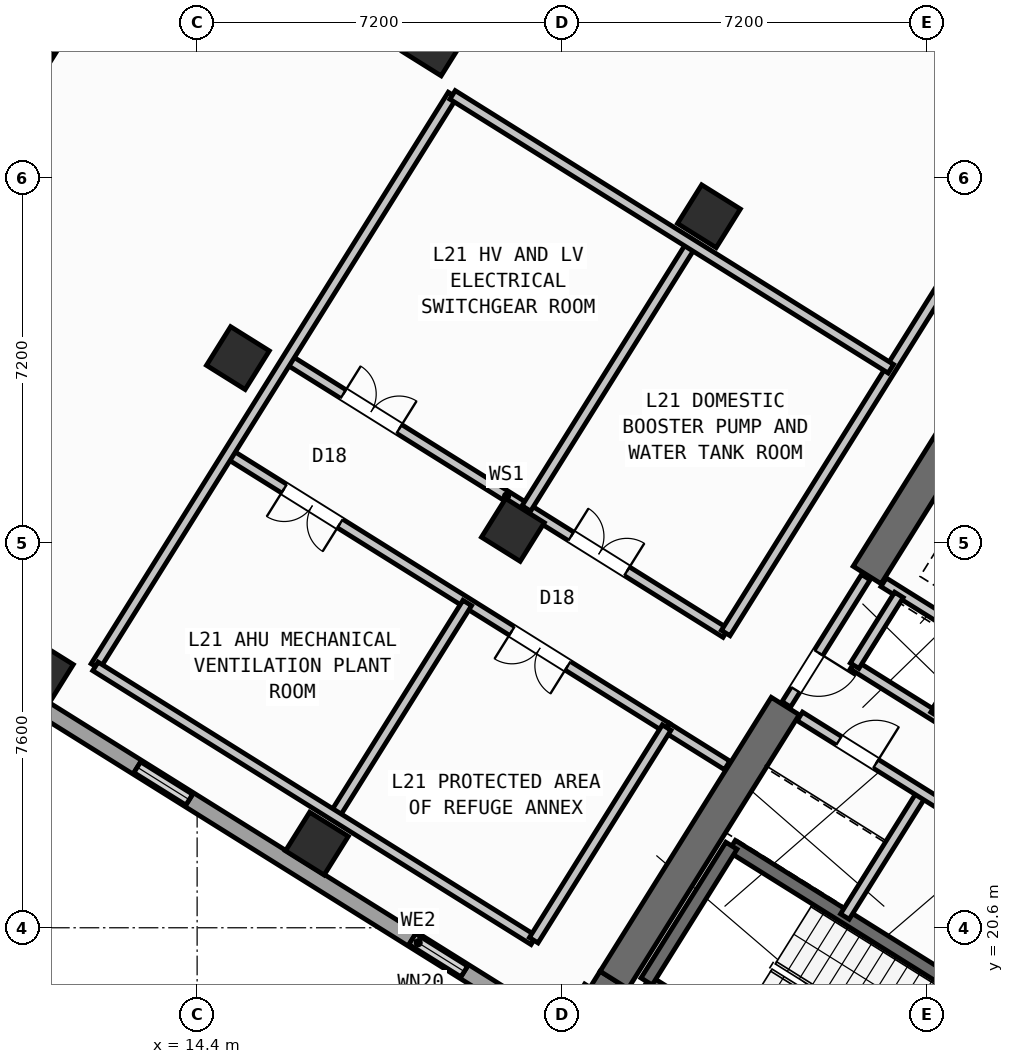
"""IFC4 building model, lengths in metres.
Left out: names, types, materials, properties, quantities, classifications, styles, units other than length and angle.
Written with IfcOpenShell. Run it as: python <this file> out.ifc"""

import sys

from ifc_helpers import new_model, si_unit, direction, frame, frame_2d, origin, origin_2d, place, context, subcontext, project, spatial, rectangle, hollow_rectangle, extrude, source, transform, mapped, element, fill, save


model = new_model("IFC4")
c1 = context("Model", 3, precision=1e-05, world=origin(), true_north=direction((0.0, 1.0)))
c2 = subcontext(c1, "Body", "Model", "MODEL_VIEW")
j1 = project(units=[si_unit("LENGTHUNIT", "METRE"), si_unit("PLANEANGLEUNIT", "RADIAN")], contexts=[c1])
p1 = place(None, origin())
s1 = spatial("IfcSite", under=j1, at=p1, CompositionType="ELEMENT")
p2 = place(p1, origin())
s2 = spatial("IfcBuilding", under=s1, at=p2, CompositionType="ELEMENT")
p3 = place(p2, frame((0.0, 0.0, 84.6)))
s3 = spatial("IfcBuildingStorey", under=s2, at=p3, CompositionType="ELEMENT", Elevation=84.6)
p4 = place(p3, frame((33.409, 12.45, 0.0), z_axis=(0.0, 0.0, 1.0), x_axis=(-0.848051132073, 0.529914405721, 0.0)))
e1 = element("IfcWall", 1, at=p4, inside=s3, PredefinedType="SHEAR", context=c2, shape_type="SweptSolid", body=[
    extrude(rectangle(XDim=13.24, YDim=0.65, at=frame_2d((6.62, 0.0))), origin(), (0.0, 0.0, 1.0), 5.15),
])
p5 = place(p3, frame((29.491, 30.552, 0.0), z_axis=(0.0, 0.0, 1.0), x_axis=(-0.529893103397, -0.8480644427, 0.0)))
e2 = element("IfcWall", 2, at=p5, inside=s3, PredefinedType="SHEAR", context=c2, shape_type="SweptSolid", body=[
    extrude(rectangle(XDim=3.525, YDim=0.65, at=frame_2d((1.763, 0.0))), origin(), (0.0, 0.0, 1.0), 5.15),
])
p6 = place(p3, frame((26.007, 24.976, 0.0), z_axis=(0.0, 0.0, 1.0), x_axis=(-0.529916319127, -0.848049936456, 0.0)))
e3 = element("IfcWall", 3, at=p6, inside=s3, PredefinedType="SHEAR", context=c2, shape_type="SweptSolid", body=[
    extrude(rectangle(XDim=6.375, YDim=0.65, at=frame_2d((3.188, 0.0))), origin(), (0.0, 0.0, 1.0), 5.15),
])
m1 = source(origin(), c2, "Body", "SweptSolid", [
    extrude(hollow_rectangle(XDim=0.9, YDim=0.9, WallThickness=0.036, at=origin_2d()), origin(), (0.0, 0.0, 1.0), 5.4),
])
for number, where, z_axis, x_axis in (
    (4, (24.5, 34.643, 0.0), (0.0, 0.0, 1.0), (-0.848, 0.53, 0.0)),
    (5, (20.632, 28.452, 0.0), (0.0, 0.0, 1.0), (-0.848, 0.53, 0.0)),
    (6, (16.764, 22.261, 0.0), (0.0, 0.0, 1.0), (-0.848, 0.53, 0.0)),
    (7, (19.073, 38.034, 0.0), (0.0, 0.0, 1.0), (-0.848, 0.53, 0.0)),
    (8, (15.205, 31.844, 0.0), (0.0, 0.0, 1.0), (-0.848, 0.53, 0.0)),
    (9, (11.336, 25.653, 0.0), (0.0, 0.0, 1.0), (-0.848, 0.53, 0.0)),
):
    element("IfcColumn", number, at=place(p3, frame(where, z_axis=z_axis, x_axis=x_axis)), inside=s3, PredefinedType="COLUMN", context=c2, shape_type="MappedRepresentation", body=[
        mapped(m1, transform((0.0, 0.0, 0.0), scale=1.0)),
    ])
p7 = place(p3, frame((31.76, 12.183, 0.0), z_axis=(0.0, 0.0, 1.0), x_axis=(-0.848047074256, 0.529920899612, 0.0)))
e10 = element("IfcWall", 10, at=p7, inside=s3, PredefinedType="STANDARD", context=c2, shape_type="SweptSolid", body=[
    extrude(rectangle(XDim=30.652, YDim=0.32, at=frame_2d((15.326, 0.0))), origin(), (0.0, 0.0, 1.0), 5.15),
])
p8 = place(p7, frame((5.029, 0.0, 0.95)))
e11 = element("IfcOpeningElement", 11, at=p8, cuts=e10, PredefinedType="OPENING", context=c2, shape_type="SweptSolid", body=[
    extrude(rectangle(XDim=1.25, YDim=1.4, at=frame_2d((0.625, 0.7))), frame((0.0, 0.17, 0.0), z_axis=(0.0, -1.0, 0.0), x_axis=(1.0, 0.0, 0.0)), (0.0, 0.0, 1.0), 0.34),
])
p9 = place(p7, frame((14.233, 0.0, 0.95)))
e12 = element("IfcOpeningElement", 12, at=p9, cuts=e10, PredefinedType="OPENING", context=c2, shape_type="SweptSolid", body=[
    extrude(rectangle(XDim=1.25, YDim=1.4, at=frame_2d((0.625, 0.7))), frame((0.0, 0.17, 0.0), z_axis=(0.0, -1.0, 0.0), x_axis=(1.0, 0.0, 0.0)), (0.0, 0.0, 1.0), 0.34),
])
p10 = place(p7, frame((20.633, 0.0, 0.95)))
e13 = element("IfcOpeningElement", 13, at=p10, cuts=e10, PredefinedType="OPENING", context=c2, shape_type="SweptSolid", body=[
    extrude(rectangle(XDim=1.25, YDim=1.4, at=frame_2d((0.625, 0.7))), frame((0.0, 0.17, 0.0), z_axis=(0.0, -1.0, 0.0), x_axis=(1.0, 0.0, 0.0)), (0.0, 0.0, 1.0), 0.34),
])
p11 = place(p7, frame((27.033, 0.0, 0.95)))
e14 = element("IfcOpeningElement", 14, at=p11, cuts=e10, PredefinedType="OPENING", context=c2, shape_type="SweptSolid", body=[
    extrude(rectangle(XDim=1.25, YDim=1.4, at=frame_2d((0.625, 0.7))), frame((0.0, 0.17, 0.0), z_axis=(0.0, -1.0, 0.0), x_axis=(1.0, 0.0, 0.0)), (0.0, 0.0, 1.0), 0.34),
])
p12 = place(p3, frame((5.7, 28.71, 0.0), z_axis=(0.0, 0.0, 1.0), x_axis=(0.529923711467, 0.8480453172, 0.0)))
e15 = element("IfcWall", 15, at=p12, inside=s3, PredefinedType="STANDARD", context=c2, shape_type="SweptSolid", body=[
    extrude(rectangle(XDim=21.587, YDim=0.32, at=frame_2d((10.794, 0.0))), origin(), (0.0, 0.0, 1.0), 4.575),
])
p13 = place(p12, frame((3.419, 0.0, 0.95)))
e16 = element("IfcOpeningElement", 16, at=p13, cuts=e15, PredefinedType="OPENING", context=c2, shape_type="SweptSolid", body=[
    extrude(rectangle(XDim=1.25, YDim=1.4, at=frame_2d((0.625, 0.7))), frame((0.0, 0.17, 0.0), z_axis=(0.0, -1.0, 0.0), x_axis=(1.0, 0.0, 0.0)), (0.0, 0.0, 1.0), 0.34),
])
p14 = place(p12, frame((10.719, 0.0, 0.95)))
e17 = element("IfcOpeningElement", 17, at=p14, cuts=e15, PredefinedType="OPENING", context=c2, shape_type="SweptSolid", body=[
    extrude(rectangle(XDim=1.25, YDim=1.4, at=frame_2d((0.625, 0.7))), frame((0.0, 0.17, 0.0), z_axis=(0.0, -1.0, 0.0), x_axis=(1.0, 0.0, 0.0)), (0.0, 0.0, 1.0), 0.34),
])
p15 = place(p12, frame((17.069, 0.0, 0.95)))
e18 = element("IfcOpeningElement", 18, at=p15, cuts=e15, PredefinedType="OPENING", context=c2, shape_type="SweptSolid", body=[
    extrude(rectangle(XDim=1.25, YDim=1.4, at=frame_2d((0.625, 0.7))), frame((0.0, 0.17, 0.0), z_axis=(0.0, -1.0, 0.0), x_axis=(1.0, 0.0, 0.0)), (0.0, 0.0, 1.0), 0.34),
])
p16 = place(p3, frame((17.424, 47.083, 0.0), z_axis=(0.0, 0.0, 1.0), x_axis=(0.848049927979, -0.529916332693, 0.0)))
e19 = element("IfcWall", 19, at=p16, inside=s3, PredefinedType="STANDARD", context=c2, shape_type="SweptSolid", body=[
    extrude(rectangle(XDim=29.223, YDim=0.32, at=frame_2d((14.612, 0.0))), origin(), (0.0, 0.0, 1.0), 5.15),
])
p17 = place(p16, frame((23.579, 0.0, 0.95)))
e20 = element("IfcOpeningElement", 20, at=p17, cuts=e19, PredefinedType="OPENING", context=c2, shape_type="SweptSolid", body=[
    extrude(rectangle(XDim=1.25, YDim=1.4, at=frame_2d((0.625, 0.7))), frame((0.0, 0.17, 0.0), z_axis=(0.0, -1.0, 0.0), x_axis=(1.0, 0.0, 0.0)), (0.0, 0.0, 1.0), 0.34),
])
p18 = place(p3, frame((29.605, 15.581, 0.0), z_axis=(0.0, 0.0, 1.0), x_axis=(-0.848036911448, 0.529937163087, 0.0)))
e21 = element("IfcWall", 21, at=p18, inside=s3, PredefinedType="SHEAR", context=c2, shape_type="SweptSolid", body=[
    extrude(rectangle(XDim=7.46, YDim=0.26, at=frame_2d((3.73, 0.0))), origin(), (0.0, 0.0, 1.0), 5.15),
])
p19 = place(p3, frame((31.28, 18.261, 0.0), z_axis=(0.0, 0.0, 1.0), x_axis=(-0.848051618787, 0.529913626805, 0.0)))
e22 = element("IfcWall", 22, at=p19, inside=s3, PredefinedType="SHEAR", context=c2, shape_type="SweptSolid", body=[
    extrude(rectangle(XDim=7.46, YDim=0.26, at=frame_2d((3.73, 0.0))), origin(), (0.0, 0.0, 1.0), 5.15),
])
p20 = place(p19, frame((0.36, 0.0, 0.0)))
e23 = element("IfcOpeningElement", 23, at=p20, cuts=e22, PredefinedType="OPENING", context=c2, shape_type="SweptSolid", body=[
    extrude(rectangle(XDim=0.86, YDim=2.05, at=frame_2d((0.43, 1.025))), frame((0.0, 0.14, 0.0), z_axis=(0.0, -1.0, 0.0), x_axis=(1.0, 0.0, 0.0)), (0.0, 0.0, 1.0), 0.28),
])
p21 = place(p3, frame((24.945, 22.22, 0.0), z_axis=(0.0, 0.0, 1.0), x_axis=(-0.529908658664, -0.84805472316, 0.0)))
e24 = element("IfcWall", 24, at=p21, inside=s3, PredefinedType="SHEAR", context=c2, shape_type="SweptSolid", body=[
    extrude(rectangle(XDim=3.16, YDim=0.26, at=frame_2d((1.58, 0.0))), origin(), (0.0, 0.0, 1.0), 5.15),
])
p22 = place(p3, frame((31.822, 24.998, 0.0), z_axis=(0.0, 0.0, 1.0), x_axis=(-0.848058348634, 0.529902856485, 0.0)))
e25 = element("IfcWall", 25, at=p22, inside=s3, PredefinedType="STANDARD", context=c2, shape_type="SweptSolid", body=[
    extrude(rectangle(XDim=4.568, YDim=0.2, at=frame_2d((2.284, 0.0))), origin(), (0.0, 0.0, 1.0), 5.14),
])
p23 = place(p3, frame((32.108, 22.814, 0.0), z_axis=(0.0, 0.0, 1.0), x_axis=(-0.848042229521, 0.529928652696, 0.0)))
e26 = element("IfcWall", 26, at=p23, inside=s3, PredefinedType="STANDARD", context=c2, shape_type="SweptSolid", body=[
    extrude(rectangle(XDim=5.62, YDim=0.2, at=frame_2d((2.81, 0.0))), origin(), (0.0, 0.0, 1.0), 5.14),
])
p24 = place(p3, frame((28.25, 27.17, 0.0), z_axis=(0.0, 0.0, 1.0), x_axis=(-0.529905827651, -0.848056492117, 0.0)))
e27 = element("IfcWall", 27, at=p24, inside=s3, PredefinedType="STANDARD", context=c2, shape_type="SweptSolid", body=[
    extrude(rectangle(XDim=1.65, YDim=0.2, at=frame_2d((0.825, 0.0))), origin(), (0.0, 0.0, 1.0), 5.14),
])
p25 = place(p3, frame((29.801, 26.142, 0.0), z_axis=(0.0, 0.0, 1.0), x_axis=(-0.529998940003, -0.847998304005, 0.0)))
e28 = element("IfcWall", 28, at=p25, inside=s3, PredefinedType="STANDARD", context=c2, shape_type="SweptSolid", body=[
    extrude(rectangle(XDim=1.58, YDim=0.2, at=frame_2d((0.79, 0.0))), origin(), (0.0, 0.0, 1.0), 5.14),
])
p26 = place(p3, frame((28.71, 23.263, 0.0), z_axis=(0.0, 0.0, 1.0), x_axis=(-0.529907497854, -0.848055448493, 0.0)))
e29 = element("IfcWall", 29, at=p26, inside=s3, PredefinedType="STANDARD", context=c2, shape_type="SweptSolid", body=[
    extrude(rectangle(XDim=2.88, YDim=0.2, at=frame_2d((1.44, 0.0))), origin(), (0.0, 0.0, 1.0), 5.14),
])
p27 = place(p3, frame((31.525, 21.504, 0.0), z_axis=(0.0, 0.0, 1.0), x_axis=(-0.848044998614, 0.529924221305, 0.0)))
e30 = element("IfcWall", 30, at=p27, inside=s3, PredefinedType="STANDARD", context=c2, shape_type="SweptSolid", body=[
    extrude(rectangle(XDim=6.168, YDim=0.2, at=frame_2d((3.084, 0.0))), origin(), (0.0, 0.0, 1.0), 5.14),
])
p28 = place(p27, frame((4.4, 0.0, 0.0)))
e31 = element("IfcOpeningElement", 31, at=p28, cuts=e30, PredefinedType="OPENING", context=c2, shape_type="SweptSolid", body=[
    extrude(rectangle(XDim=0.86, YDim=2.05, at=frame_2d((0.43, 1.025))), frame((0.0, 0.11, 0.0), z_axis=(0.0, -1.0, 0.0), x_axis=(1.0, 0.0, 0.0)), (0.0, 0.0, 1.0), 0.22),
])
p29 = place(p27, frame((1.45, 0.0, 0.0)))
e32 = element("IfcOpeningElement", 32, at=p29, cuts=e30, PredefinedType="OPENING", context=c2, shape_type="SweptSolid", body=[
    extrude(rectangle(XDim=0.86, YDim=2.05, at=frame_2d((0.43, 1.025))), frame((0.0, 0.11, 0.0), z_axis=(0.0, -1.0, 0.0), x_axis=(1.0, 0.0, 0.0)), (0.0, 0.0, 1.0), 0.22),
])
p30 = place(p3, frame((24.832, 26.417, 0.0), z_axis=(0.0, 0.0, 1.0), x_axis=(-0.848045364107, 0.529923636401, 0.0)))
e33 = element("IfcWall", 33, at=p30, inside=s3, PredefinedType="STANDARD", context=c2, shape_type="SweptSolid", body=[
    extrude(rectangle(XDim=10.2, YDim=0.2, at=frame_2d((5.1, 0.0))), origin(), (0.0, 0.0, 1.0), 5.14),
])
p31 = place(p30, frame((2.3, 0.0, 0.0)))
e34 = element("IfcOpeningElement", 34, at=p31, cuts=e33, PredefinedType="OPENING", context=c2, shape_type="SweptSolid", body=[
    extrude(rectangle(XDim=1.3, YDim=2.15, at=frame_2d((0.65, 1.075))), frame((0.0, 0.11, 0.0), z_axis=(0.0, -1.0, 0.0), x_axis=(1.0, 0.0, 0.0)), (0.0, 0.0, 1.0), 0.22),
])
p32 = place(p30, frame((7.6, 0.0, 0.0)))
e35 = element("IfcOpeningElement", 35, at=p32, cuts=e33, PredefinedType="OPENING", context=c2, shape_type="SweptSolid", body=[
    extrude(rectangle(XDim=1.3, YDim=2.15, at=frame_2d((0.65, 1.075))), frame((0.0, 0.11, 0.0), z_axis=(0.0, -1.0, 0.0), x_axis=(1.0, 0.0, 0.0)), (0.0, 0.0, 1.0), 0.22),
])
p33 = place(p3, frame((23.666, 24.552, 0.0), z_axis=(0.0, 0.0, 1.0), x_axis=(-0.848038642463, 0.529934393004, 0.0)))
e36 = element("IfcWall", 36, at=p33, inside=s3, PredefinedType="STANDARD", context=c2, shape_type="SweptSolid", body=[
    extrude(rectangle(XDim=10.2, YDim=0.2, at=frame_2d((5.1, 0.0))), origin(), (0.0, 0.0, 1.0), 5.14),
])
p34 = place(p33, frame((2.3, 0.0, 0.0)))
e37 = element("IfcOpeningElement", 37, at=p34, cuts=e36, PredefinedType="OPENING", context=c2, shape_type="SweptSolid", body=[
    extrude(rectangle(XDim=1.3, YDim=2.15, at=frame_2d((0.65, 1.075))), frame((0.0, 0.11, 0.0), z_axis=(0.0, -1.0, 0.0), x_axis=(1.0, 0.0, 0.0)), (0.0, 0.0, 1.0), 0.22),
])
p35 = place(p33, frame((7.6, 0.0, 0.0)))
e38 = element("IfcOpeningElement", 38, at=p35, cuts=e36, PredefinedType="OPENING", context=c2, shape_type="SweptSolid", body=[
    extrude(rectangle(XDim=1.3, YDim=2.15, at=frame_2d((0.65, 1.075))), frame((0.0, 0.11, 0.0), z_axis=(0.0, -1.0, 0.0), x_axis=(1.0, 0.0, 0.0)), (0.0, 0.0, 1.0), 0.22),
])
p36 = place(p3, frame((19.441, 37.038, 0.0), z_axis=(0.0, 0.0, 1.0), x_axis=(-0.529936237412, -0.848037489901, 0.0)))
e39 = element("IfcWall", 39, at=p36, inside=s3, PredefinedType="STANDARD", context=c2, shape_type="SweptSolid", body=[
    extrude(rectangle(XDim=13.3, YDim=0.2, at=frame_2d((6.65, 0.0))), origin(), (0.0, 0.0, 1.0), 5.14),
])
p37 = place(p3, frame((27.596, 27.52, 0.0), z_axis=(0.0, 0.0, 1.0), x_axis=(-0.529865479138, -0.848081702443, 0.0)))
e40 = element("IfcWall", 40, at=p37, inside=s3, PredefinedType="STANDARD", context=c2, shape_type="SweptSolid", body=[
    extrude(rectangle(XDim=2.96, YDim=0.2, at=frame_2d((1.48, 0.0))), origin(), (0.0, 0.0, 1.0), 5.14),
])
p38 = place(p37, frame((1.76, 0.0, 0.0)))
e41 = element("IfcOpeningElement", 41, at=p38, cuts=e40, PredefinedType="OPENING", context=c2, shape_type="SweptSolid", body=[
    extrude(rectangle(XDim=0.86, YDim=2.05, at=frame_2d((0.43, 1.025))), frame((0.0, 0.11, 0.0), z_axis=(0.0, -1.0, 0.0), x_axis=(1.0, 0.0, 0.0)), (0.0, 0.0, 1.0), 0.22),
])
p39 = place(p3, frame((24.86, 23.805, 0.0), z_axis=(0.0, 0.0, 1.0), x_axis=(-0.848066485351, 0.529889834233, 0.0)))
e42 = element("IfcWall", 42, at=p39, inside=s3, PredefinedType="STANDARD", context=c2, shape_type="SweptSolid", body=[
    extrude(rectangle(XDim=1.408, YDim=0.2, at=frame_2d((0.704, 0.0))), origin(), (0.0, 0.0, 1.0), 5.14),
])
p40 = place(p3, frame((31.112, 36.467, 0.0), z_axis=(0.0, 0.0, 1.0), x_axis=(-0.529921156925, -0.848046913469, 0.0)))
e43 = element("IfcWall", 43, at=p40, inside=s3, PredefinedType="STANDARD", context=c2, shape_type="SweptSolid", body=[
    extrude(rectangle(XDim=11.85, YDim=0.2, at=frame_2d((5.925, 0.0))), origin(), (0.0, 0.0, 1.0), 5.14),
])
p41 = place(p3, frame((19.731, 27.01, 0.0), z_axis=(0.0, 0.0, 1.0), x_axis=(-0.529896970672, -0.848062026312, 0.0)))
e44 = element("IfcWall", 44, at=p41, inside=s3, PredefinedType="STANDARD", context=c2, shape_type="SweptSolid", body=[
    extrude(rectangle(XDim=4.95, YDim=0.2, at=frame_2d((2.475, 0.0))), origin(), (0.0, 0.0, 1.0), 4.575),
])
p42 = place(p3, frame((24.156, 34.092, 0.0), z_axis=(0.0, 0.0, 1.0), x_axis=(-0.529934707271, -0.84803844608, 0.0)))
e45 = element("IfcWall", 45, at=p42, inside=s3, PredefinedType="STANDARD", context=c2, shape_type="SweptSolid", body=[
    extrude(rectangle(XDim=6.15, YDim=0.2, at=frame_2d((3.075, 0.0))), origin(), (0.0, 0.0, 1.0), 4.575),
])
p43 = place(p3, frame((21.043, 20.354, 0.0), z_axis=(0.0, 0.0, 1.0), x_axis=(-0.848045364107, 0.529923636401, 0.0)))
e46 = element("IfcWall", 46, at=p43, inside=s3, PredefinedType="STANDARD", context=c2, shape_type="SweptSolid", body=[
    extrude(rectangle(XDim=10.2, YDim=0.2, at=frame_2d((5.1, 0.0))), origin(), (0.0, 0.0, 1.0), 5.14),
])
p44 = place(p3, frame((28.091, 31.633, 0.0), z_axis=(0.0, 0.0, 1.0), x_axis=(-0.848049399204, 0.529917178916, 0.0)))
e47 = element("IfcWall", 47, at=p44, inside=s3, PredefinedType="STANDARD", context=c2, shape_type="SweptSolid", body=[
    extrude(rectangle(XDim=10.2, YDim=0.2, at=frame_2d((5.1, 0.0))), origin(), (0.0, 0.0, 1.0), 5.14),
])
p45 = place(p3, frame((23.666, 24.552, 0.0), z_axis=(0.0, 0.0, 1.0), x_axis=(-0.529919135231, -0.848048176766, 0.0)))
e48 = element("IfcWall", 48, at=p45, inside=s3, PredefinedType="STANDARD", context=c2, shape_type="SweptSolid", body=[
    extrude(rectangle(XDim=4.95, YDim=0.2, at=frame_2d((2.475, 0.0))), origin(), (0.0, 0.0, 1.0), 5.14),
])
m2 = source(origin(), c2, "Body", "SweptSolid", [
    extrude(rectangle(XDim=1.25, YDim=1.4, at=frame_2d((0.625, 0.7))), frame((0.0, 0.03, 0.0), z_axis=(0.0, -1.0, 0.0), x_axis=(1.0, 0.0, 0.0)), (0.0, 0.0, 1.0), 0.06),
])
p46 = place(p9, origin())
e49 = element("IfcWindow", 49, at=p46, inside=s3, PartitioningType="SINGLE_PANEL", PredefinedType="WINDOW", context=c2, shape_type="MappedRepresentation", body=[
    mapped(m2, transform((0.0, 0.0, 0.0), scale=1.0)),
])
fill(e12, e49)
p47 = place(p10, origin())
e50 = element("IfcWindow", 50, at=p47, inside=s3, PartitioningType="SINGLE_PANEL", PredefinedType="WINDOW", context=c2, shape_type="MappedRepresentation", body=[
    mapped(m2, transform((0.0, 0.0, 0.0), scale=1.0)),
])
fill(e13, e50)
p48 = place(p14, origin())
e51 = element("IfcWindow", 51, at=p48, inside=s3, PartitioningType="SINGLE_PANEL", PredefinedType="WINDOW", context=c2, shape_type="MappedRepresentation", body=[
    mapped(m2, transform((0.0, 0.0, 0.0), scale=1.0)),
])
fill(e17, e51)
m3 = source(origin(), c2, "Body", "SweptSolid", [
    extrude(rectangle(XDim=0.86, YDim=2.05, at=frame_2d((0.43, 1.025))), frame((0.0, 0.025, 0.0), z_axis=(0.0, -1.0, 0.0), x_axis=(1.0, 0.0, 0.0)), (0.0, 0.0, 1.0), 0.05),
])
p49 = place(p28, frame((0.86, 0.0, 0.0), z_axis=(0.0, 0.0, 1.0), x_axis=(-1.0, 0.0, 0.0)))
e52 = element("IfcDoor", 52, at=p49, inside=s3, OperationType="SINGLE_SWING_RIGHT", PredefinedType="DOOR", context=c2, shape_type="MappedRepresentation", body=[
    mapped(m3, transform((0.0, 0.0, 0.0), scale=1.0)),
])
fill(e31, e52)
p50 = place(p38, origin())
e53 = element("IfcDoor", 53, at=p50, inside=s3, OperationType="SINGLE_SWING_LEFT", PredefinedType="DOOR", context=c2, shape_type="MappedRepresentation", body=[
    mapped(m3, transform((0.0, 0.0, 0.0), scale=1.0)),
])
fill(e41, e53)
m4 = source(origin(), c2, "Body", "SweptSolid", [
    extrude(rectangle(XDim=1.3, YDim=2.15, at=frame_2d((0.65, 1.075))), frame((0.0, 0.025, 0.0), z_axis=(0.0, -1.0, 0.0), x_axis=(1.0, 0.0, 0.0)), (0.0, 0.0, 1.0), 0.05),
])
p51 = place(p34, origin())
e54 = element("IfcDoor", 54, at=p51, inside=s3, OperationType="DOUBLE_DOOR_SINGLE_SWING", PredefinedType="DOOR", context=c2, shape_type="MappedRepresentation", body=[
    mapped(m4, transform((0.0, 0.0, 0.0), scale=1.0)),
])
fill(e37, e54)
p52 = place(p35, origin())
e55 = element("IfcDoor", 55, at=p52, inside=s3, OperationType="DOUBLE_DOOR_SINGLE_SWING", PredefinedType="DOOR", context=c2, shape_type="MappedRepresentation", body=[
    mapped(m4, transform((0.0, 0.0, 0.0), scale=1.0)),
])
fill(e38, e55)
p53 = place(p31, frame((1.3, 0.0, 0.0), z_axis=(0.0, 0.0, 1.0), x_axis=(-1.0, 0.0, 0.0)))
e56 = element("IfcDoor", 56, at=p53, inside=s3, OperationType="DOUBLE_DOOR_SINGLE_SWING", PredefinedType="DOOR", context=c2, shape_type="MappedRepresentation", body=[
    mapped(m4, transform((0.0, 0.0, 0.0), scale=1.0)),
])
fill(e34, e56)
p54 = place(p32, frame((1.3, 0.0, 0.0), z_axis=(0.0, 0.0, 1.0), x_axis=(-1.0, 0.0, 0.0)))
e57 = element("IfcDoor", 57, at=p54, inside=s3, OperationType="DOUBLE_DOOR_SINGLE_SWING", PredefinedType="DOOR", context=c2, shape_type="MappedRepresentation", body=[
    mapped(m4, transform((0.0, 0.0, 0.0), scale=1.0)),
])
fill(e35, e57)
save(model, sys.argv[1])
